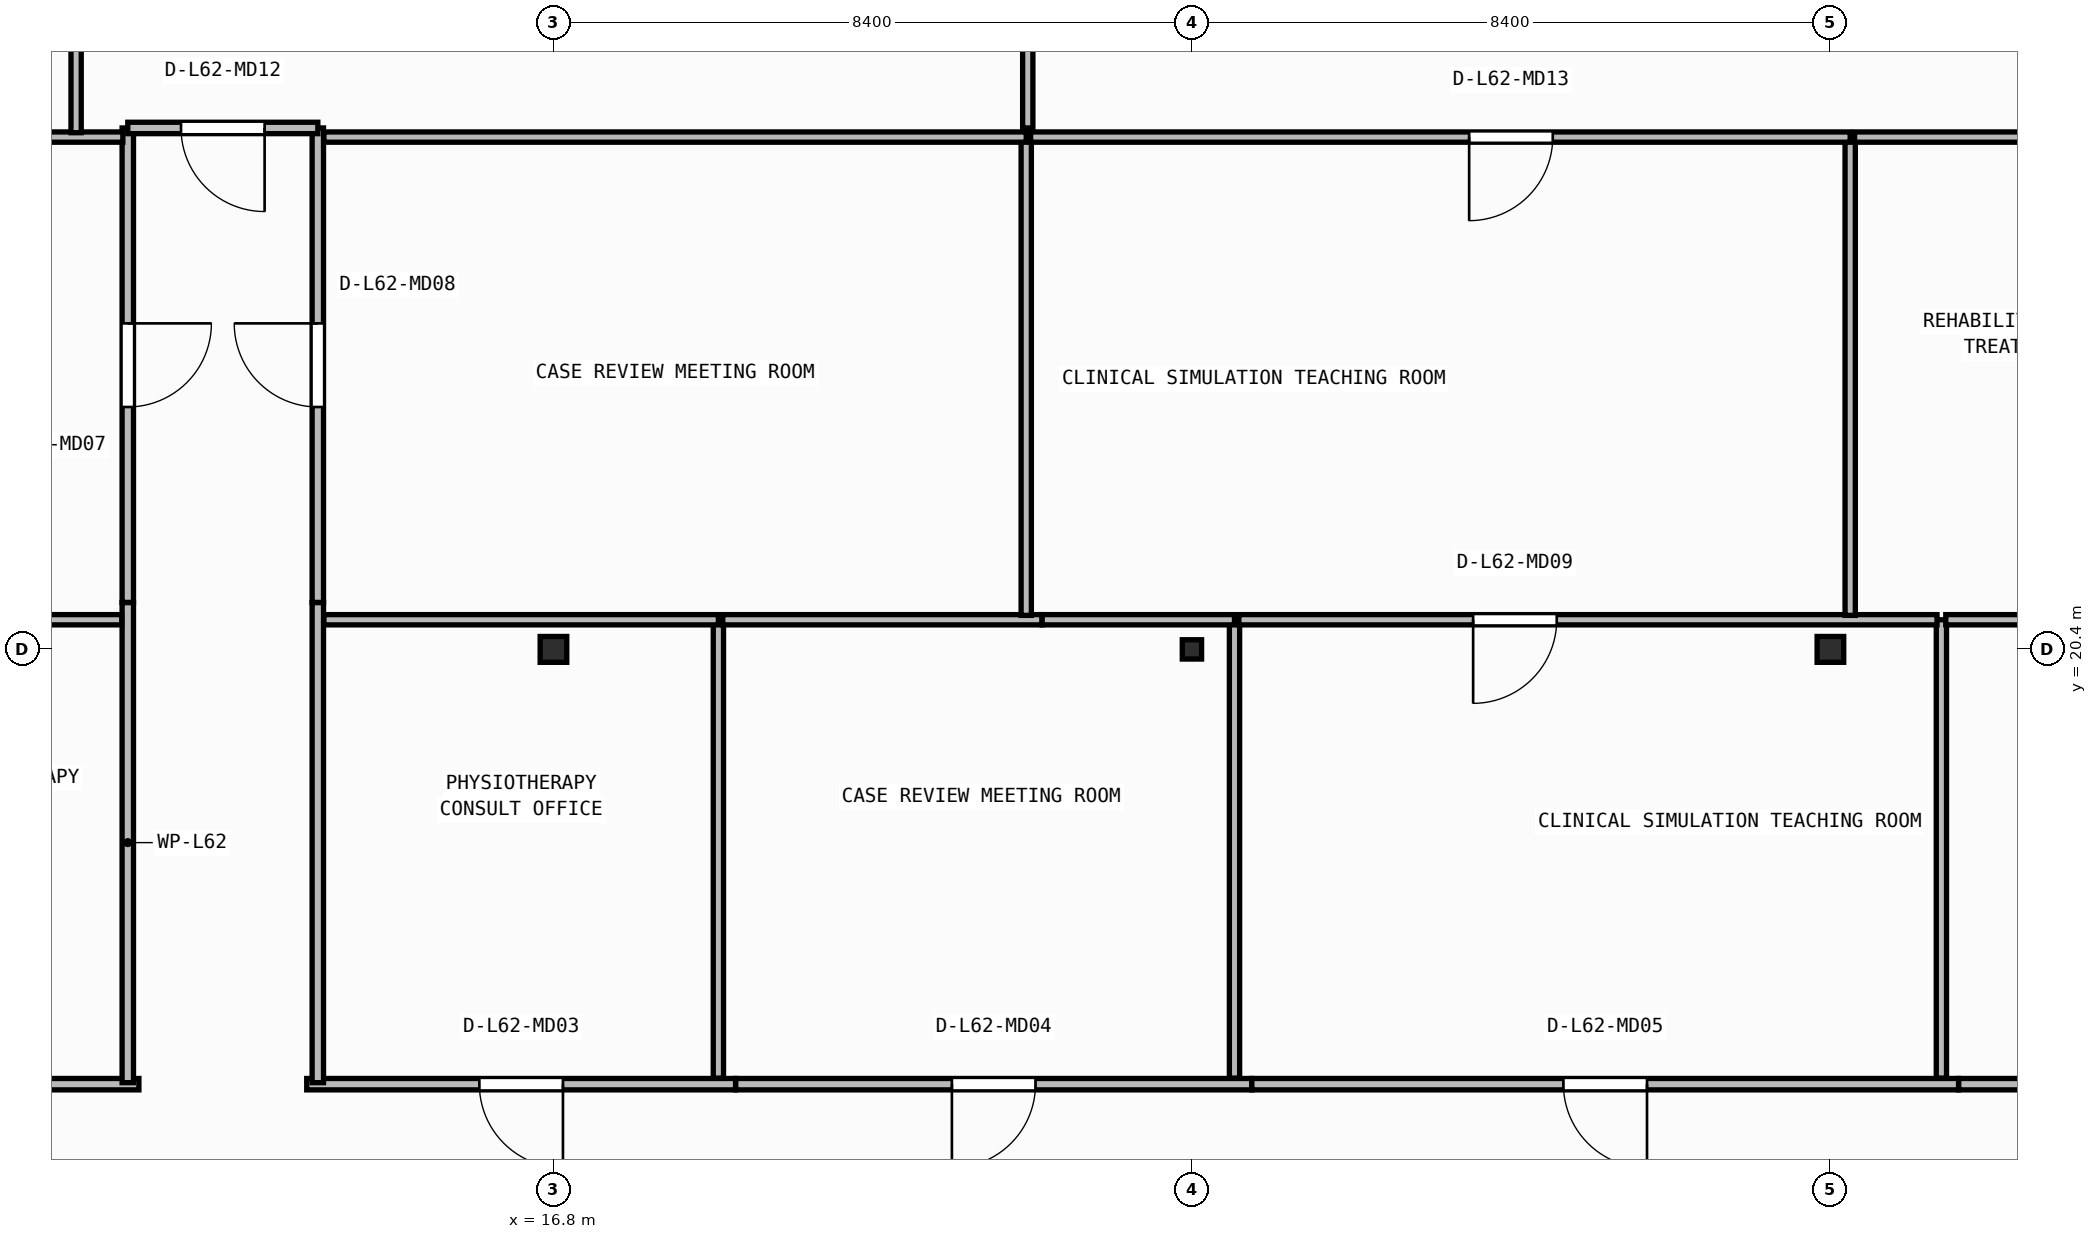
"""IFC4 building model, lengths in metres.
Left out: names, types, materials, properties, quantities, classifications, styles, units other than length and angle.
Written with IfcOpenShell. Run it as: python <this file> out.ifc"""

import sys

from ifc_helpers import new_model, si_unit, direction, frame, frame_2d, origin, origin_2d, place, context, subcontext, project, spatial, rectangle, i_section, extrude, element, fill, save


model = new_model("IFC4")
c1 = context("Model", 3, precision=1e-05, world=origin(), true_north=direction((0.0, 1.0)))
c2 = subcontext(c1, "Body", "Model", "MODEL_VIEW")
j1 = project(units=[si_unit("LENGTHUNIT", "METRE"), si_unit("PLANEANGLEUNIT", "RADIAN")], contexts=[c1])
p1 = place(None, origin())
s1 = spatial("IfcSite", under=j1, at=p1, CompositionType="ELEMENT")
p2 = place(p1, origin())
s2 = spatial("IfcBuilding", under=s1, at=p2, CompositionType="ELEMENT")
p3 = place(p2, frame((0.0, 0.0, 252.6)))
s3 = spatial("IfcBuildingStorey", under=s2, at=p3, CompositionType="ELEMENT", Elevation=252.6)
p4 = place(p3, frame((16.8, 20.4, 0.0), z_axis=(0.0, 0.0, 1.0), x_axis=(1.0, 0.0, 0.0)))
e1 = element("IfcColumn", 1, at=p4, inside=s3, PredefinedType="COLUMN", context=c2, shape_type="SweptSolid", body=[
    extrude(i_section(OverallWidth=0.35, OverallDepth=0.34, WebThickness=0.016, FlangeThickness=0.028, at=origin_2d()), origin(), (0.0, 0.0, 1.0), 3.95),
])
p5 = place(p3, frame((25.2, 20.4, 0.0), z_axis=(0.0, 0.0, 1.0), x_axis=(1.0, 0.0, 0.0)))
e2 = element("IfcColumn", 2, at=p5, inside=s3, PredefinedType="COLUMN", context=c2, shape_type="SweptSolid", body=[
    extrude(i_section(OverallWidth=0.254, OverallDepth=0.254, WebThickness=0.009, FlangeThickness=0.014, FilletRadius=0.013, at=origin_2d()), origin(), (0.0, 0.0, 1.0), 3.95),
])
p6 = place(p3, frame((33.6, 20.4, 0.0), z_axis=(0.0, 0.0, 1.0), x_axis=(1.0, 0.0, 0.0)))
e3 = element("IfcColumn", 3, at=p6, inside=s3, PredefinedType="COLUMN", context=c2, shape_type="SweptSolid", body=[
    extrude(i_section(OverallWidth=0.35, OverallDepth=0.34, WebThickness=0.016, FlangeThickness=0.028, at=origin_2d()), origin(), (0.0, 0.0, 1.0), 3.95),
])
p7 = place(p3, frame((11.346, 14.68, 0.0), z_axis=(0.0, 0.0, 1.0), x_axis=(-1.0, 0.0, 0.0)))
e4 = element("IfcWall", 4, at=p7, inside=s3, PredefinedType="PARTITIONING", context=c2, shape_type="SweptSolid", body=[
    extrude(rectangle(XDim=4.254, YDim=0.15, at=frame_2d((2.127, 0.0))), origin(), (0.0, 0.0, 1.0), 3.71),
])
p8 = place(p7, frame((1.577, 0.0, 0.0)))
e5 = element("IfcOpeningElement", 5, at=p8, cuts=e4, PredefinedType="OPENING", context=c2, shape_type="SweptSolid", body=[
    extrude(rectangle(XDim=1.1, YDim=2.1, at=frame_2d((0.55, 1.05))), frame((0.0, 0.085, 0.0), z_axis=(0.0, -1.0, 0.0), x_axis=(1.0, 0.0, 0.0)), (0.0, 0.0, 1.0), 0.17),
])
p9 = place(p3, frame((19.196, 14.68, 0.0), z_axis=(0.0, 0.0, 1.0), x_axis=(-1.0, 0.0, 0.0)))
e6 = element("IfcWall", 6, at=p9, inside=s3, PredefinedType="PARTITIONING", context=c2, shape_type="SweptSolid", body=[
    extrude(rectangle(XDim=5.642, YDim=0.15, at=frame_2d((2.821, 0.0))), origin(), (0.0, 0.0, 1.0), 3.71),
])
p10 = place(p9, frame((2.271, 0.0, 0.0)))
e7 = element("IfcOpeningElement", 7, at=p10, cuts=e6, PredefinedType="OPENING", context=c2, shape_type="SweptSolid", body=[
    extrude(rectangle(XDim=1.1, YDim=2.1, at=frame_2d((0.55, 1.05))), frame((0.0, 0.085, 0.0), z_axis=(0.0, -1.0, 0.0), x_axis=(1.0, 0.0, 0.0)), (0.0, 0.0, 1.0), 0.17),
])
p11 = place(p3, frame((25.986, 14.68, 0.0), z_axis=(0.0, 0.0, 1.0), x_axis=(-1.0, 0.0, 0.0)))
e8 = element("IfcWall", 8, at=p11, inside=s3, PredefinedType="PARTITIONING", context=c2, shape_type="SweptSolid", body=[
    extrude(rectangle(XDim=6.788, YDim=0.15, at=frame_2d((3.394, 0.0))), origin(), (0.0, 0.0, 1.0), 3.71),
])
p12 = place(p11, frame((2.844, 0.0, 0.0)))
e9 = element("IfcOpeningElement", 9, at=p12, cuts=e8, PredefinedType="OPENING", context=c2, shape_type="SweptSolid", body=[
    extrude(rectangle(XDim=1.1, YDim=2.1, at=frame_2d((0.55, 1.05))), frame((0.0, 0.085, 0.0), z_axis=(0.0, -1.0, 0.0), x_axis=(1.0, 0.0, 0.0)), (0.0, 0.0, 1.0), 0.17),
])
p13 = place(p3, frame((35.286, 14.68, 0.0), z_axis=(0.0, 0.0, 1.0), x_axis=(-1.0, 0.0, 0.0)))
e10 = element("IfcWall", 10, at=p13, inside=s3, PredefinedType="PARTITIONING", context=c2, shape_type="SweptSolid", body=[
    extrude(rectangle(XDim=9.298, YDim=0.15, at=frame_2d((4.649, 0.0))), origin(), (0.0, 0.0, 1.0), 3.71),
])
p14 = place(p13, frame((4.099, 0.0, 0.0)))
e11 = element("IfcOpeningElement", 11, at=p14, cuts=e10, PredefinedType="OPENING", context=c2, shape_type="SweptSolid", body=[
    extrude(rectangle(XDim=1.1, YDim=2.1, at=frame_2d((0.55, 1.05))), frame((0.0, 0.085, 0.0), z_axis=(0.0, -1.0, 0.0), x_axis=(1.0, 0.0, 0.0)), (0.0, 0.0, 1.0), 0.17),
])
p15 = place(p3, frame((45.92, 14.68, 0.0), z_axis=(0.0, 0.0, 1.0), x_axis=(-1.0, 0.0, 0.0)))
e12 = element("IfcWall", 12, at=p15, inside=s3, PredefinedType="PARTITIONING", context=c2, shape_type="SweptSolid", body=[
    extrude(rectangle(XDim=10.632, YDim=0.15, at=frame_2d((5.316, 0.0))), origin(), (0.0, 0.0, 1.0), 3.71),
])
p16 = place(p15, frame((4.766, 0.0, 0.0)))
e13 = element("IfcOpeningElement", 13, at=p16, cuts=e12, PredefinedType="OPENING", context=c2, shape_type="SweptSolid", body=[
    extrude(rectangle(XDim=1.1, YDim=2.1, at=frame_2d((0.55, 1.05))), frame((0.0, 0.085, 0.0), z_axis=(0.0, -1.0, 0.0), x_axis=(1.0, 0.0, 0.0)), (0.0, 0.0, 1.0), 0.17),
])
for number, where, z_axis, x_axis in (
    (14, (11.2, 21.016, 0.0), (0.0, 0.0, 1.0), (0.0, -1.0, 0.0)),
    (15, (13.7, 14.7, 0.0), (0.0, 0.0, 1.0), (0.0, 1.0, 0.0)),
):
    element("IfcWall", number, at=place(p3, frame(where, z_axis=z_axis, x_axis=x_axis)), inside=s3, PredefinedType="PARTITIONING", context=c2, shape_type="SweptSolid", body=[
        extrude(rectangle(XDim=6.316, YDim=0.15, at=frame_2d((3.158, 0.0))), origin(), (0.0, 0.0, 1.0), 3.71),
    ])
p17 = place(p3, frame((11.2, 27.26, 0.0), z_axis=(0.0, 0.0, 1.0), x_axis=(0.0, -1.0, 0.0)))
e16 = element("IfcWall", 16, at=p17, inside=s3, PredefinedType="PARTITIONING", context=c2, shape_type="SweptSolid", body=[
    extrude(rectangle(XDim=6.242, YDim=0.15, at=frame_2d((3.121, 0.0))), origin(), (0.0, 0.0, 1.0), 3.71),
])
p18 = place(p17, frame((2.571, 0.0, 0.0)))
e17 = element("IfcOpeningElement", 17, at=p18, cuts=e16, PredefinedType="OPENING", context=c2, shape_type="SweptSolid", body=[
    extrude(rectangle(XDim=1.1, YDim=2.1, at=frame_2d((0.55, 1.05))), frame((0.0, 0.085, 0.0), z_axis=(0.0, -1.0, 0.0), x_axis=(1.0, 0.0, 0.0)), (0.0, 0.0, 1.0), 0.17),
])
p19 = place(p3, frame((13.7, 21.018, 0.0), z_axis=(0.0, 0.0, 1.0), x_axis=(0.0, 1.0, 0.0)))
e18 = element("IfcWall", 18, at=p19, inside=s3, PredefinedType="PARTITIONING", context=c2, shape_type="SweptSolid", body=[
    extrude(rectangle(XDim=6.242, YDim=0.15, at=frame_2d((3.121, 0.0))), origin(), (0.0, 0.0, 1.0), 3.71),
])
p20 = place(p19, frame((2.571, 0.0, 0.0)))
e19 = element("IfcOpeningElement", 19, at=p20, cuts=e18, PredefinedType="OPENING", context=c2, shape_type="SweptSolid", body=[
    extrude(rectangle(XDim=1.1, YDim=2.1, at=frame_2d((0.55, 1.05))), frame((0.0, 0.085, 0.0), z_axis=(0.0, -1.0, 0.0), x_axis=(1.0, 0.0, 0.0)), (0.0, 0.0, 1.0), 0.17),
])
p21 = place(p3, frame((13.7, 27.26, 0.0), z_axis=(0.0, 0.0, 1.0), x_axis=(-1.0, 0.0, 0.0)))
e20 = element("IfcWall", 20, at=p21, inside=s3, PredefinedType="PARTITIONING", context=c2, shape_type="SweptSolid", body=[
    extrude(rectangle(XDim=2.5, YDim=0.15, at=frame_2d((1.25, 0.0))), origin(), (0.0, 0.0, 1.0), 3.71),
])
p22 = place(p21, frame((0.7, 0.0, 0.0)))
e21 = element("IfcOpeningElement", 21, at=p22, cuts=e20, PredefinedType="OPENING", context=c2, shape_type="SweptSolid", body=[
    extrude(rectangle(XDim=1.1, YDim=2.1, at=frame_2d((0.55, 1.05))), frame((0.0, 0.085, 0.0), z_axis=(0.0, -1.0, 0.0), x_axis=(1.0, 0.0, 0.0)), (0.0, 0.0, 1.0), 0.17),
])
p23 = place(p3, frame((11.12, 20.79, 0.0), z_axis=(0.0, 0.0, 1.0), x_axis=(-1.0, 0.0, 0.0)))
e22 = element("IfcWall", 22, at=p23, inside=s3, PredefinedType="PARTITIONING", context=c2, shape_type="SweptSolid", body=[
    extrude(rectangle(XDim=5.003, YDim=0.135, at=frame_2d((2.501, 0.0))), origin(), (0.0, 0.0, 1.0), 3.157),
])
p24 = place(p3, frame((18.97, 14.76, 0.0), z_axis=(0.0, 0.0, 1.0), x_axis=(0.0, 1.0, 0.0)))
e23 = element("IfcWall", 23, at=p24, inside=s3, PredefinedType="PARTITIONING", context=c2, shape_type="SweptSolid", body=[
    extrude(rectangle(XDim=6.03, YDim=0.135, at=frame_2d((3.015, 0.0))), origin(), (0.0, 0.0, 1.0), 3.71),
])
p25 = place(p3, frame((18.97, 20.79, 0.0), z_axis=(0.0, 0.0, 1.0), x_axis=(-1.0, 0.0, 0.0)))
e24 = element("IfcWall", 24, at=p25, inside=s3, PredefinedType="PARTITIONING", context=c2, shape_type="SweptSolid", body=[
    extrude(rectangle(XDim=5.19, YDim=0.135, at=frame_2d((2.595, 0.0))), origin(), (0.0, 0.0, 1.0), 3.157),
])
p26 = place(p3, frame((25.76, 14.76, 0.0), z_axis=(0.0, 0.0, 1.0), x_axis=(0.0, 1.0, 0.0)))
e25 = element("IfcWall", 25, at=p26, inside=s3, PredefinedType="PARTITIONING", context=c2, shape_type="SweptSolid", body=[
    extrude(rectangle(XDim=6.03, YDim=0.135, at=frame_2d((3.015, 0.0))), origin(), (0.0, 0.0, 1.0), 3.71),
])
p27 = place(p3, frame((23.228, 20.79, 0.0), z_axis=(0.0, 0.0, 1.0), x_axis=(-1.0, 0.0, 0.0)))
e26 = element("IfcWall", 26, at=p27, inside=s3, PredefinedType="PARTITIONING", context=c2, shape_type="SweptSolid", body=[
    extrude(rectangle(XDim=4.2, YDim=0.135, at=frame_2d((2.1, 0.0))), origin(), (0.0, 0.0, 1.0), 3.157),
])
p28 = place(p3, frame((25.76, 20.79, 0.0), z_axis=(0.0, 0.0, 1.0), x_axis=(-1.0, 0.0, 0.0)))
e27 = element("IfcWall", 27, at=p28, inside=s3, PredefinedType="PARTITIONING", context=c2, shape_type="SweptSolid", body=[
    extrude(rectangle(XDim=2.531, YDim=0.135, at=frame_2d((1.265, 0.0))), origin(), (0.0, 0.0, 1.0), 3.157),
])
p29 = place(p3, frame((35.06, 14.76, 0.0), z_axis=(0.0, 0.0, 1.0), x_axis=(0.0, 1.0, 0.0)))
e28 = element("IfcWall", 28, at=p29, inside=s3, PredefinedType="PARTITIONING", context=c2, shape_type="SweptSolid", body=[
    extrude(rectangle(XDim=6.03, YDim=0.135, at=frame_2d((3.015, 0.0))), origin(), (0.0, 0.0, 1.0), 3.71),
])
p30 = place(p3, frame((35.002, 20.79, 0.0), z_axis=(0.0, 0.0, 1.0), x_axis=(-1.0, 0.0, 0.0)))
e29 = element("IfcWall", 29, at=p30, inside=s3, PredefinedType="PARTITIONING", context=c2, shape_type="SweptSolid", body=[
    extrude(rectangle(XDim=9.185, YDim=0.135, at=frame_2d((4.593, 0.0))), origin(), (0.0, 0.0, 1.0), 3.157),
])
p31 = place(p30, frame((5.003, 0.0, 0.0)))
e30 = element("IfcOpeningElement", 30, at=p31, cuts=e29, PredefinedType="OPENING", context=c2, shape_type="SweptSolid", body=[
    extrude(rectangle(XDim=1.1, YDim=2.1, at=frame_2d((0.55, 1.05))), frame((0.0, 0.077, 0.0), z_axis=(0.0, -1.0, 0.0), x_axis=(1.0, 0.0, 0.0)), (0.0, 0.0, 1.0), 0.155),
])
p32 = place(p3, frame((39.317, 20.79, 0.0), z_axis=(0.0, 0.0, 1.0), x_axis=(-1.0, 0.0, 0.0)))
e31 = element("IfcWall", 31, at=p32, inside=s3, PredefinedType="PARTITIONING", context=c2, shape_type="SweptSolid", body=[
    extrude(rectangle(XDim=4.2, YDim=0.135, at=frame_2d((2.1, 0.0))), origin(), (0.0, 0.0, 1.0), 3.157),
])
p33 = place(p32, frame((0.335, 0.0, 0.0)))
e32 = element("IfcOpeningElement", 32, at=p33, cuts=e31, PredefinedType="OPENING", context=c2, shape_type="SweptSolid", body=[
    extrude(rectangle(XDim=1.1, YDim=2.1, at=frame_2d((0.55, 1.05))), frame((0.0, 0.077, 0.0), z_axis=(0.0, -1.0, 0.0), x_axis=(1.0, 0.0, 0.0)), (0.0, 0.0, 1.0), 0.155),
])
p34 = place(p3, frame((11.135, 27.14, 0.0), z_axis=(0.0, 0.0, 1.0), x_axis=(-1.0, 0.0, 0.0)))
e33 = element("IfcWall", 33, at=p34, inside=s3, PredefinedType="PARTITIONING", context=c2, shape_type="SweptSolid", body=[
    extrude(rectangle(XDim=10.895, YDim=0.135, at=frame_2d((5.448, 0.0))), origin(), (0.0, 0.0, 1.0), 3.71),
])
p35 = place(p34, frame((5.837, 0.0, 0.0)))
e34 = element("IfcOpeningElement", 34, at=p35, cuts=e33, PredefinedType="OPENING", context=c2, shape_type="SweptSolid", body=[
    extrude(rectangle(XDim=1.1, YDim=2.1, at=frame_2d((0.55, 1.05))), frame((0.0, 0.077, 0.0), z_axis=(0.0, -1.0, 0.0), x_axis=(1.0, 0.0, 0.0)), (0.0, 0.0, 1.0), 0.155),
])
p36 = place(p3, frame((23.02, 20.847, 0.0), z_axis=(0.0, 0.0, 1.0), x_axis=(0.0, 1.0, 0.0)))
e35 = element("IfcWall", 35, at=p36, inside=s3, PredefinedType="PARTITIONING", context=c2, shape_type="SweptSolid", body=[
    extrude(rectangle(XDim=6.292, YDim=0.135, at=frame_2d((3.146, 0.0))), origin(), (0.0, 0.0, 1.0), 3.71),
])
p37 = place(p3, frame((23.02, 27.14, 0.0), z_axis=(0.0, 0.0, 1.0), x_axis=(-1.0, 0.0, 0.0)))
e36 = element("IfcWall", 36, at=p37, inside=s3, PredefinedType="PARTITIONING", context=c2, shape_type="SweptSolid", body=[
    extrude(rectangle(XDim=9.24, YDim=0.135, at=frame_2d((4.62, 0.0))), origin(), (0.0, 0.0, 1.0), 3.71),
])
p38 = place(p3, frame((33.86, 20.847, 0.0), z_axis=(0.0, 0.0, 1.0), x_axis=(0.0, 1.0, 0.0)))
e37 = element("IfcWall", 37, at=p38, inside=s3, PredefinedType="PARTITIONING", context=c2, shape_type="SweptSolid", body=[
    extrude(rectangle(XDim=6.292, YDim=0.135, at=frame_2d((3.146, 0.0))), origin(), (0.0, 0.0, 1.0), 3.157),
])
p39 = place(p3, frame((33.86, 27.14, 0.0), z_axis=(0.0, 0.0, 1.0), x_axis=(-1.0, 0.0, 0.0)))
e38 = element("IfcWall", 38, at=p39, inside=s3, PredefinedType="PARTITIONING", context=c2, shape_type="SweptSolid", body=[
    extrude(rectangle(XDim=10.783, YDim=0.135, at=frame_2d((5.391, 0.0))), origin(), (0.0, 0.0, 1.0), 3.71),
])
p40 = place(p39, frame((3.913, 0.0, 0.0)))
e39 = element("IfcOpeningElement", 39, at=p40, cuts=e38, PredefinedType="OPENING", context=c2, shape_type="SweptSolid", body=[
    extrude(rectangle(XDim=1.1, YDim=2.1, at=frame_2d((0.55, 1.05))), frame((0.0, 0.077, 0.0), z_axis=(0.0, -1.0, 0.0), x_axis=(1.0, 0.0, 0.0)), (0.0, 0.0, 1.0), 0.155),
])
p41 = place(p3, frame((39.11, 27.14, 0.0), z_axis=(0.0, 0.0, 1.0), x_axis=(-1.0, 0.0, 0.0)))
e40 = element("IfcWall", 40, at=p41, inside=s3, PredefinedType="PARTITIONING", context=c2, shape_type="SweptSolid", body=[
    extrude(rectangle(XDim=5.193, YDim=0.135, at=frame_2d((2.596, 0.0))), origin(), (0.0, 0.0, 1.0), 3.71),
])
p42 = place(p3, frame((10.52, 27.198, 0.0), z_axis=(0.0, 0.0, 1.0), x_axis=(0.0, 1.0, 0.0)))
e41 = element("IfcWall", 41, at=p42, inside=s3, PredefinedType="PARTITIONING", context=c2, shape_type="SweptSolid", body=[
    extrude(rectangle(XDim=9.164, YDim=0.135, at=frame_2d((4.582, 0.0))), origin(), (0.0, 0.0, 1.0), 3.71),
])
p43 = place(p3, frame((23.04, 27.26, 0.0), z_axis=(0.0, 0.0, 1.0), x_axis=(0.0, 1.0, 0.0)))
e42 = element("IfcWall", 42, at=p43, inside=s3, PredefinedType="PARTITIONING", context=c2, shape_type="SweptSolid", body=[
    extrude(rectangle(XDim=4.234, YDim=0.135, at=frame_2d((2.117, 0.0))), origin(), (0.0, 0.0, 1.0), 3.71),
])
p44 = place(p10, origin())
e43 = element("IfcDoor", 43, at=p44, inside=s3, OperationType="SINGLE_SWING_LEFT", PredefinedType="DOOR", context=c2, shape_type="SweptSolid", body=[
    extrude(rectangle(XDim=1.1, YDim=2.1, at=frame_2d((0.55, 1.05))), frame((0.0, 0.025, 0.0), z_axis=(0.0, -1.0, 0.0), x_axis=(1.0, 0.0, 0.0)), (0.0, 0.0, 1.0), 0.05),
])
fill(e7, e43)
p45 = place(p12, origin())
e44 = element("IfcDoor", 44, at=p45, inside=s3, OperationType="SINGLE_SWING_RIGHT", PredefinedType="DOOR", context=c2, shape_type="SweptSolid", body=[
    extrude(rectangle(XDim=1.1, YDim=2.1, at=frame_2d((0.55, 1.05))), frame((0.0, 0.025, 0.0), z_axis=(0.0, -1.0, 0.0), x_axis=(1.0, 0.0, 0.0)), (0.0, 0.0, 1.0), 0.05),
])
fill(e9, e44)
p46 = place(p14, origin())
e45 = element("IfcDoor", 45, at=p46, inside=s3, OperationType="SINGLE_SWING_LEFT", PredefinedType="DOOR", context=c2, shape_type="SweptSolid", body=[
    extrude(rectangle(XDim=1.1, YDim=2.1, at=frame_2d((0.55, 1.05))), frame((0.0, 0.025, 0.0), z_axis=(0.0, -1.0, 0.0), x_axis=(1.0, 0.0, 0.0)), (0.0, 0.0, 1.0), 0.05),
])
fill(e11, e45)
p47 = place(p18, origin())
e46 = element("IfcDoor", 46, at=p47, inside=s3, OperationType="SINGLE_SWING_LEFT", PredefinedType="DOOR", context=c2, shape_type="SweptSolid", body=[
    extrude(rectangle(XDim=1.1, YDim=2.1, at=frame_2d((0.55, 1.05))), frame((0.0, 0.025, 0.0), z_axis=(0.0, -1.0, 0.0), x_axis=(1.0, 0.0, 0.0)), (0.0, 0.0, 1.0), 0.05),
])
fill(e17, e46)
p48 = place(p20, origin())
e47 = element("IfcDoor", 47, at=p48, inside=s3, OperationType="SINGLE_SWING_RIGHT", PredefinedType="DOOR", context=c2, shape_type="SweptSolid", body=[
    extrude(rectangle(XDim=1.1, YDim=2.1, at=frame_2d((0.55, 1.05))), frame((0.0, 0.025, 0.0), z_axis=(0.0, -1.0, 0.0), x_axis=(1.0, 0.0, 0.0)), (0.0, 0.0, 1.0), 0.05),
])
fill(e19, e47)
p49 = place(p22, origin())
e48 = element("IfcDoor", 48, at=p49, inside=s3, OperationType="SINGLE_SWING_LEFT", PredefinedType="DOOR", context=c2, shape_type="SweptSolid", body=[
    extrude(rectangle(XDim=1.1, YDim=2.1, at=frame_2d((0.55, 1.05))), frame((0.0, 0.025, 0.0), z_axis=(0.0, -1.0, 0.0), x_axis=(1.0, 0.0, 0.0)), (0.0, 0.0, 1.0), 0.05),
])
fill(e21, e48)
p50 = place(p31, origin())
e49 = element("IfcDoor", 49, at=p50, inside=s3, OperationType="SINGLE_SWING_RIGHT", PredefinedType="DOOR", context=c2, shape_type="SweptSolid", body=[
    extrude(rectangle(XDim=1.1, YDim=2.1, at=frame_2d((0.55, 1.05))), frame((0.0, 0.025, 0.0), z_axis=(0.0, -1.0, 0.0), x_axis=(1.0, 0.0, 0.0)), (0.0, 0.0, 1.0), 0.05),
])
fill(e30, e49)
p51 = place(p40, origin())
e50 = element("IfcDoor", 50, at=p51, inside=s3, OperationType="SINGLE_SWING_RIGHT", PredefinedType="DOOR", context=c2, shape_type="SweptSolid", body=[
    extrude(rectangle(XDim=1.1, YDim=2.1, at=frame_2d((0.55, 1.05))), frame((0.0, 0.025, 0.0), z_axis=(0.0, -1.0, 0.0), x_axis=(1.0, 0.0, 0.0)), (0.0, 0.0, 1.0), 0.05),
])
fill(e39, e50)
save(model, sys.argv[1])
